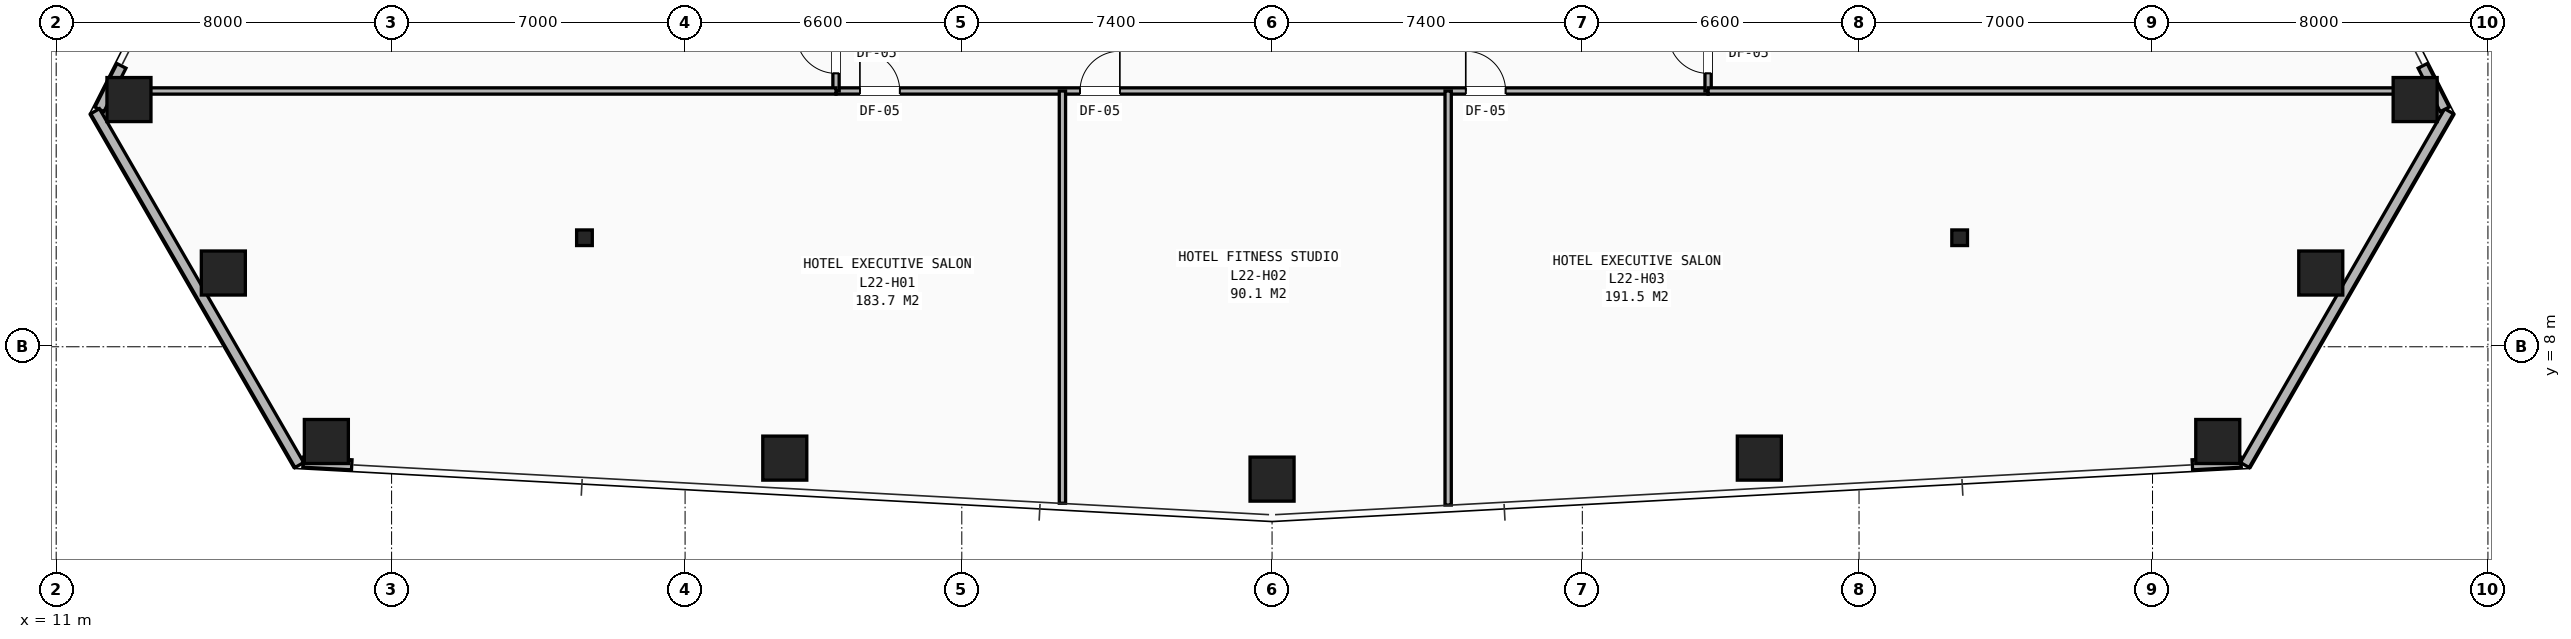
"""IFC4 building model, lengths in metres.
Left out: names, types, materials, properties, quantities, classifications, styles, units other than length and angle.
Written with IfcOpenShell. Run it as: python <this file> out.ifc"""

import sys

from ifc_helpers import new_model, si_unit, direction, frame, frame_2d, origin, origin_2d, place, context, subcontext, project, spatial, rectangle, hollow_rectangle, i_section, extrude, element, fill, save


model = new_model("IFC4")
c1 = context("Model", 3, precision=1e-05, world=origin(), true_north=direction((0.0, 1.0)))
c2 = subcontext(c1, "Body", "Model", "MODEL_VIEW")
j1 = project(units=[si_unit("LENGTHUNIT", "METRE"), si_unit("PLANEANGLEUNIT", "RADIAN")], contexts=[c1])
p1 = place(None, origin())
s1 = spatial("IfcSite", under=j1, at=p1, CompositionType="ELEMENT")
p2 = place(p1, origin())
s2 = spatial("IfcBuilding", under=s1, at=p2, CompositionType="ELEMENT")
p3 = place(p2, frame((0.0, 0.0, 79.8)))
s3 = spatial("IfcBuildingStorey", under=s2, at=p3, CompositionType="ELEMENT", Elevation=79.8)
for number, where, z_axis, x_axis in (
    (1, (23.6, 10.6, 0.0), (0.0, 0.0, 1.0), (1.0, 0.0, 0.0)),
    (2, (56.4, 10.6, 0.0), (0.0, 0.0, 1.0), (1.0, 0.0, 0.0)),
):
    element("IfcColumn", number, at=place(p3, frame(where, z_axis=z_axis, x_axis=x_axis)), inside=s3, PredefinedType="COLUMN", context=c2, shape_type="SweptSolid", body=[
        extrude(i_section(OverallWidth=0.374, OverallDepth=0.372, WebThickness=0.016, FlangeThickness=0.026, at=origin_2d()), origin(), (0.0, 0.0, 1.0), 3.2),
    ])
for number, where, z_axis, x_axis in (
    (3, (12.736, 13.896, 0.0), (0.0, 0.0, 1.0), (1.0, 0.0, 0.0)),
    (4, (14.987, 9.759, 0.0), (0.0, 0.0, 1.0), (1.0, 0.0, 0.0)),
    (5, (17.444, 5.741, 0.0), (0.0, 0.0, 1.0), (1.0, 0.0, 0.0)),
    (6, (28.378, 5.344, 0.0), (0.0, 0.0, 1.0), (1.0, 0.0, 0.0)),
    (7, (40.0, 4.844, 0.0), (0.0, 0.0, 1.0), (1.0, 0.0, 0.0)),
    (8, (51.622, 5.344, 0.0), (0.0, 0.0, 1.0), (1.0, 0.0, 0.0)),
    (9, (62.556, 5.741, 0.0), (0.0, 0.0, 1.0), (1.0, 0.0, 0.0)),
    (10, (65.013, 9.759, 0.0), (0.0, 0.0, 1.0), (1.0, 0.0, 0.0)),
    (11, (67.264, 13.896, 0.0), (0.0, 0.0, 1.0), (1.0, 0.0, 0.0)),
):
    element("IfcColumn", number, at=place(p3, frame(where, z_axis=z_axis, x_axis=x_axis)), inside=s3, PredefinedType="COLUMN", context=c2, shape_type="SweptSolid", body=[
        extrude(hollow_rectangle(XDim=1.05, YDim=1.05, WallThickness=0.07, at=origin_2d()), origin(), (0.0, 0.0, 1.0), 3.2),
    ])
p4 = place(p3, frame((12.557, 14.698, 0.0), z_axis=(0.0, 0.0, 1.0), x_axis=(-0.452163091908, -0.891935276977, 0.0)))
e12 = element("IfcWall", 12, at=p4, inside=s3, PredefinedType="SHEAR", context=c2, shape_type="SweptSolid", body=[
    extrude(rectangle(XDim=1.163, YDim=0.24, at=frame_2d((0.581, 0.0))), origin(), (0.0, 0.0, 1.0), 2.253),
])
p5 = place(p3, frame((16.799, 5.18, 0.0), z_axis=(0.0, 0.0, 1.0), x_axis=(-0.499984915177, 0.866034112836, 0.0)))
e13 = element("IfcWall", 13, at=p5, inside=s3, PredefinedType="SHEAR", context=c2, shape_type="SweptSolid", body=[
    extrude(rectangle(XDim=9.743, YDim=0.24, at=frame_2d((4.872, 0.0))), origin(), (0.0, 0.0, 1.0), 2.253),
])
for number, where, z_axis, x_axis in (
    (14, (16.889, 5.248, 0.0), (0.0, 0.0, 1.0), (0.999, -0.054, 0.0)),
    (15, (61.95, 5.185, 0.0), (0.0, 0.0, 1.0), (0.999, 0.054, 0.0)),
):
    element("IfcWall", number, at=place(p3, frame(where, z_axis=z_axis, x_axis=x_axis)), inside=s3, PredefinedType="SHEAR", context=c2, shape_type="SweptSolid", body=[
        extrude(rectangle(XDim=1.162, YDim=0.24, at=frame_2d((0.581, 0.0))), origin(), (0.0, 0.0, 1.0), 2.253),
    ])
p6 = place(p3, frame((68.072, 13.618, 0.0), z_axis=(0.0, 0.0, 1.0), x_axis=(-0.499984915177, -0.866034112836, 0.0)))
e16 = element("IfcWall", 16, at=p6, inside=s3, PredefinedType="SHEAR", context=c2, shape_type="SweptSolid", body=[
    extrude(rectangle(XDim=9.743, YDim=0.24, at=frame_2d((4.872, 0.0))), origin(), (0.0, 0.0, 1.0), 2.253),
])
p7 = place(p3, frame((67.969, 13.661, 0.0), z_axis=(0.0, 0.0, 1.0), x_axis=(-0.452163091908, 0.891935276977, 0.0)))
e17 = element("IfcWall", 17, at=p7, inside=s3, PredefinedType="SHEAR", context=c2, shape_type="SweptSolid", body=[
    extrude(rectangle(XDim=1.163, YDim=0.24, at=frame_2d((0.581, 0.0))), origin(), (0.0, 0.0, 1.0), 2.253),
])
p8 = place(p3, frame((29.6, 14.1, 0.0), z_axis=(0.0, 0.0, 1.0), x_axis=(1.0, 0.0, 0.0)))
e18 = element("IfcWall", 18, at=p8, inside=s3, PredefinedType="PARTITIONING", context=c2, shape_type="SweptSolid", body=[
    extrude(rectangle(XDim=20.8, YDim=0.15, at=frame_2d((10.4, 0.0))), origin(), (0.0, 0.0, 1.0), 2.181),
])
p9 = place(p8, frame((0.57, 0.0, 0.0)))
e19 = element("IfcOpeningElement", 19, at=p9, cuts=e18, PredefinedType="OPENING", context=c2, shape_type="SweptSolid", body=[
    extrude(rectangle(XDim=0.95, YDim=2.1, at=frame_2d((0.475, 1.05))), frame((0.0, 0.085, 0.0), z_axis=(0.0, -1.0, 0.0), x_axis=(1.0, 0.0, 0.0)), (0.0, 0.0, 1.0), 0.17),
])
p10 = place(p8, frame((5.82, 0.0, 0.0)))
e20 = element("IfcOpeningElement", 20, at=p10, cuts=e18, PredefinedType="OPENING", context=c2, shape_type="SweptSolid", body=[
    extrude(rectangle(XDim=0.95, YDim=2.1, at=frame_2d((0.475, 1.05))), frame((0.0, 0.085, 0.0), z_axis=(0.0, -1.0, 0.0), x_axis=(1.0, 0.0, 0.0)), (0.0, 0.0, 1.0), 0.17),
])
p11 = place(p8, frame((15.02, 0.0, 0.0)))
e21 = element("IfcOpeningElement", 21, at=p11, cuts=e18, PredefinedType="OPENING", context=c2, shape_type="SweptSolid", body=[
    extrude(rectangle(XDim=0.95, YDim=2.1, at=frame_2d((0.475, 1.05))), frame((0.0, 0.085, 0.0), z_axis=(0.0, -1.0, 0.0), x_axis=(1.0, 0.0, 0.0)), (0.0, 0.0, 1.0), 0.17),
])
p12 = place(p3, frame((29.6, 14.1, 0.0), z_axis=(0.0, 0.0, 1.0), x_axis=(0.0, 1.0, 0.0)))
e22 = element("IfcWall", 22, at=p12, inside=s3, PredefinedType="PARTITIONING", context=c2, shape_type="SweptSolid", body=[
    extrude(rectangle(XDim=21.9, YDim=0.15, at=frame_2d((10.95, 0.0))), origin(), (0.0, 0.0, 1.0), 2.181),
])
p13 = place(p12, frame((0.42, 0.0, 0.0)))
e23 = element("IfcOpeningElement", 23, at=p13, cuts=e22, PredefinedType="OPENING", context=c2, shape_type="SweptSolid", body=[
    extrude(rectangle(XDim=0.95, YDim=2.1, at=frame_2d((0.475, 1.05))), frame((0.0, 0.085, 0.0), z_axis=(0.0, -1.0, 0.0), x_axis=(1.0, 0.0, 0.0)), (0.0, 0.0, 1.0), 0.17),
])
p14 = place(p12, frame((5.82, 0.0, 0.0)))
e24 = element("IfcOpeningElement", 24, at=p14, cuts=e22, PredefinedType="OPENING", context=c2, shape_type="SweptSolid", body=[
    extrude(rectangle(XDim=0.95, YDim=2.1, at=frame_2d((0.475, 1.05))), frame((0.0, 0.085, 0.0), z_axis=(0.0, -1.0, 0.0), x_axis=(1.0, 0.0, 0.0)), (0.0, 0.0, 1.0), 0.17),
])
p15 = place(p12, frame((11.32, 0.0, 0.0)))
e25 = element("IfcOpeningElement", 25, at=p15, cuts=e22, PredefinedType="OPENING", context=c2, shape_type="SweptSolid", body=[
    extrude(rectangle(XDim=0.95, YDim=2.1, at=frame_2d((0.475, 1.05))), frame((0.0, 0.085, 0.0), z_axis=(0.0, -1.0, 0.0), x_axis=(1.0, 0.0, 0.0)), (0.0, 0.0, 1.0), 0.17),
])
p16 = place(p12, frame((16.82, 0.0, 0.0)))
e26 = element("IfcOpeningElement", 26, at=p16, cuts=e22, PredefinedType="OPENING", context=c2, shape_type="SweptSolid", body=[
    extrude(rectangle(XDim=0.95, YDim=2.1, at=frame_2d((0.475, 1.05))), frame((0.0, 0.085, 0.0), z_axis=(0.0, -1.0, 0.0), x_axis=(1.0, 0.0, 0.0)), (0.0, 0.0, 1.0), 0.17),
])
p17 = place(p3, frame((50.4, 14.1, 0.0), z_axis=(0.0, 0.0, 1.0), x_axis=(0.0, 1.0, 0.0)))
e27 = element("IfcWall", 27, at=p17, inside=s3, PredefinedType="PARTITIONING", context=c2, shape_type="SweptSolid", body=[
    extrude(rectangle(XDim=21.9, YDim=0.15, at=frame_2d((10.95, 0.0))), origin(), (0.0, 0.0, 1.0), 2.181),
])
p18 = place(p17, frame((0.42, 0.0, 0.0)))
e28 = element("IfcOpeningElement", 28, at=p18, cuts=e27, PredefinedType="OPENING", context=c2, shape_type="SweptSolid", body=[
    extrude(rectangle(XDim=0.95, YDim=2.1, at=frame_2d((0.475, 1.05))), frame((0.0, 0.085, 0.0), z_axis=(0.0, -1.0, 0.0), x_axis=(1.0, 0.0, 0.0)), (0.0, 0.0, 1.0), 0.17),
])
p19 = place(p17, frame((11.82, 0.0, 0.0)))
e29 = element("IfcOpeningElement", 29, at=p19, cuts=e27, PredefinedType="OPENING", context=c2, shape_type="SweptSolid", body=[
    extrude(rectangle(XDim=0.95, YDim=2.1, at=frame_2d((0.475, 1.05))), frame((0.0, 0.085, 0.0), z_axis=(0.0, -1.0, 0.0), x_axis=(1.0, 0.0, 0.0)), (0.0, 0.0, 1.0), 0.17),
])
p20 = place(p3, frame((35.0, 4.269, 0.0), z_axis=(0.0, 0.0, 1.0), x_axis=(0.0, 1.0, 0.0)))
e30 = element("IfcWall", 30, at=p20, inside=s3, PredefinedType="PARTITIONING", context=c2, shape_type="SweptSolid", body=[
    extrude(rectangle(XDim=9.831, YDim=0.15, at=frame_2d((4.916, 0.0))), origin(), (0.0, 0.0, 1.0), 2.181),
])
p21 = place(p3, frame((44.2, 4.225, 0.0), z_axis=(0.0, 0.0, 1.0), x_axis=(0.0, 1.0, 0.0)))
e31 = element("IfcWall", 31, at=p21, inside=s3, PredefinedType="PARTITIONING", context=c2, shape_type="SweptSolid", body=[
    extrude(rectangle(XDim=9.875, YDim=0.15, at=frame_2d((4.938, 0.0))), origin(), (0.0, 0.0, 1.0), 2.258),
])
for number, where, z_axis, x_axis in (
    (32, (12.26, 14.1, 0.0), (0.0, 0.0, 1.0), (1.0, 0.0, 0.0)),
    (33, (50.4, 14.1, 0.0), (0.0, 0.0, 1.0), (1.0, 0.0, 0.0)),
):
    element("IfcWall", number, at=place(p3, frame(where, z_axis=z_axis, x_axis=x_axis)), inside=s3, PredefinedType="PARTITIONING", context=c2, shape_type="SweptSolid", body=[
        extrude(rectangle(XDim=17.341, YDim=0.15, at=frame_2d((8.67, 0.0))), origin(), (0.0, 0.0, 1.0), 2.181),
    ])
p22 = place(p9, origin())
e34 = element("IfcDoor", 34, at=p22, inside=s3, OperationType="SINGLE_SWING_LEFT", PredefinedType="DOOR", context=c2, shape_type="SweptSolid", body=[
    extrude(rectangle(XDim=0.95, YDim=2.1, at=frame_2d((0.475, 1.05))), frame((0.0, 0.025, 0.0), z_axis=(0.0, -1.0, 0.0), x_axis=(1.0, 0.0, 0.0)), (0.0, 0.0, 1.0), 0.05),
])
fill(e19, e34)
p23 = place(p10, origin())
e35 = element("IfcDoor", 35, at=p23, inside=s3, OperationType="SINGLE_SWING_RIGHT", PredefinedType="DOOR", context=c2, shape_type="SweptSolid", body=[
    extrude(rectangle(XDim=0.95, YDim=2.1, at=frame_2d((0.475, 1.05))), frame((0.0, 0.025, 0.0), z_axis=(0.0, -1.0, 0.0), x_axis=(1.0, 0.0, 0.0)), (0.0, 0.0, 1.0), 0.05),
])
fill(e20, e35)
p24 = place(p11, origin())
e36 = element("IfcDoor", 36, at=p24, inside=s3, OperationType="SINGLE_SWING_LEFT", PredefinedType="DOOR", context=c2, shape_type="SweptSolid", body=[
    extrude(rectangle(XDim=0.95, YDim=2.1, at=frame_2d((0.475, 1.05))), frame((0.0, 0.025, 0.0), z_axis=(0.0, -1.0, 0.0), x_axis=(1.0, 0.0, 0.0)), (0.0, 0.0, 1.0), 0.05),
])
fill(e21, e36)
p25 = place(p13, origin())
e37 = element("IfcDoor", 37, at=p25, inside=s3, OperationType="SINGLE_SWING_RIGHT", PredefinedType="DOOR", context=c2, shape_type="SweptSolid", body=[
    extrude(rectangle(XDim=0.95, YDim=2.1, at=frame_2d((0.475, 1.05))), frame((0.0, 0.025, 0.0), z_axis=(0.0, -1.0, 0.0), x_axis=(1.0, 0.0, 0.0)), (0.0, 0.0, 1.0), 0.05),
])
fill(e23, e37)
p26 = place(p18, origin())
e38 = element("IfcDoor", 38, at=p26, inside=s3, OperationType="SINGLE_SWING_RIGHT", PredefinedType="DOOR", context=c2, shape_type="SweptSolid", body=[
    extrude(rectangle(XDim=0.95, YDim=2.1, at=frame_2d((0.475, 1.05))), frame((0.0, 0.025, 0.0), z_axis=(0.0, -1.0, 0.0), x_axis=(1.0, 0.0, 0.0)), (0.0, 0.0, 1.0), 0.05),
])
fill(e28, e38)
save(model, sys.argv[1])
